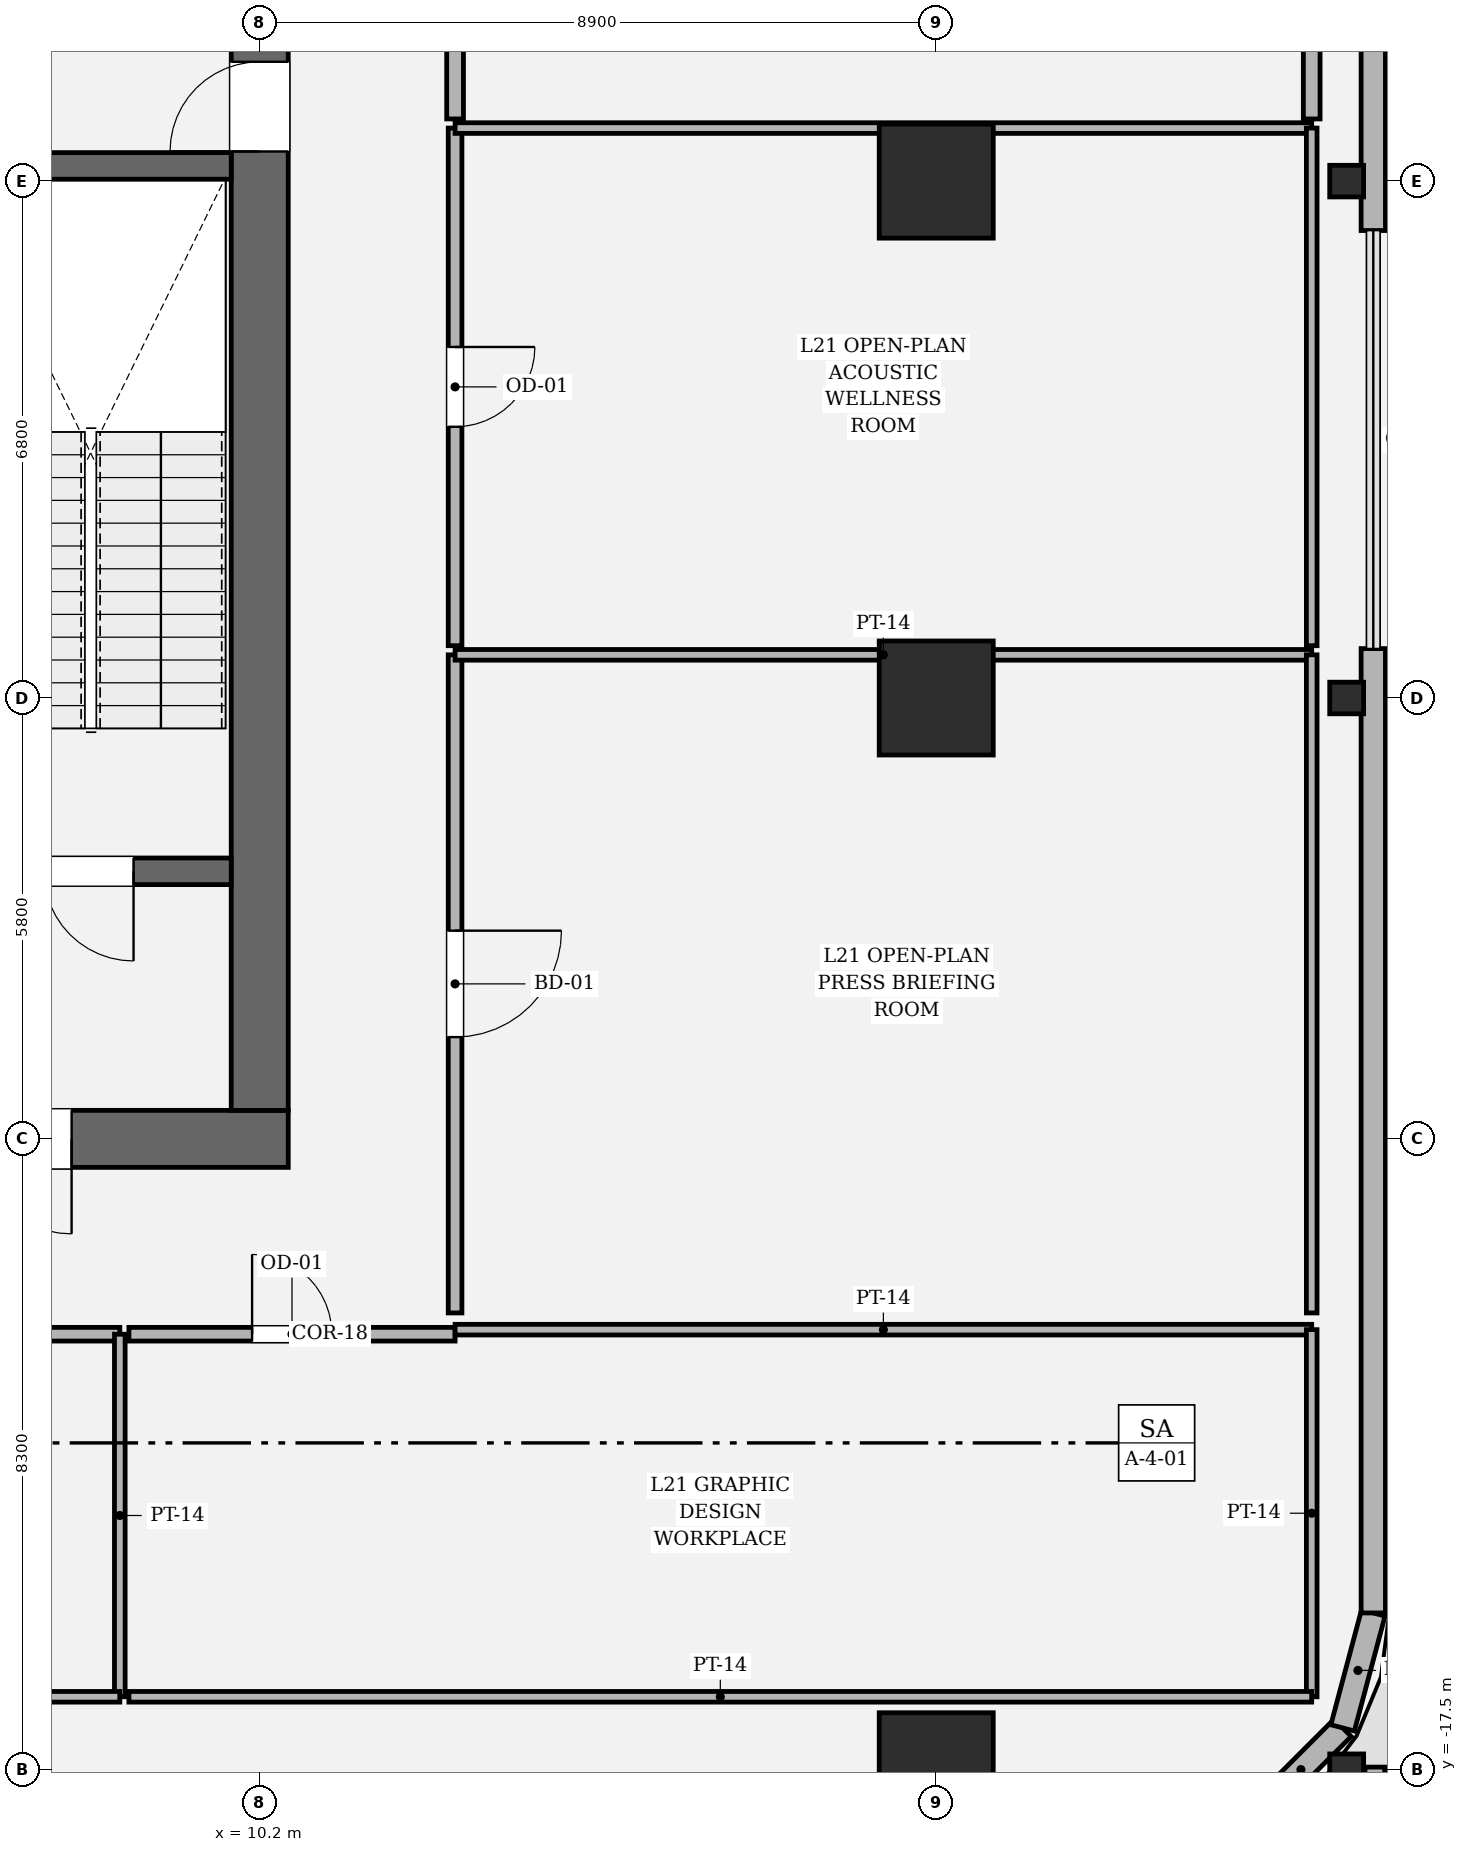
"""IFC4 building model, lengths in metres.
Left out: names, types, materials, properties, quantities, classifications, styles, units other than length and angle.
Written with IfcOpenShell. Run it as: python <this file> out.ifc"""

import sys

from ifc_helpers import new_model, si_unit, direction, frame, frame_2d, origin, origin_2d, place, context, subcontext, project, spatial, rectangle, hollow_rectangle, i_section, extrude, element, fill, save


model = new_model("IFC4")
c1 = context("Model", 3, precision=1e-05, world=origin(), true_north=direction((0.0, 1.0)))
c2 = subcontext(c1, "Body", "Model", "MODEL_VIEW")
j1 = project(units=[si_unit("LENGTHUNIT", "METRE"), si_unit("PLANEANGLEUNIT", "RADIAN")], contexts=[c1])
p1 = place(None, origin())
s1 = spatial("IfcSite", under=j1, at=p1, CompositionType="ELEMENT")
p2 = place(p1, origin())
s2 = spatial("IfcBuilding", under=s1, at=p2, CompositionType="ELEMENT")
p3 = place(p2, frame((0.0, 0.0, 93.0)))
s3 = spatial("IfcBuildingStorey", under=s2, at=p3, CompositionType="ELEMENT", Elevation=93.0)
p4 = place(p3, frame((10.575, -9.2, 0.0), z_axis=(0.0, 0.0, 1.0), x_axis=(-1.0, 0.0, 0.0)))
e1 = element("IfcWall", 1, at=p4, inside=s3, PredefinedType="SHEAR", context=c2, shape_type="SweptSolid", body=[
    extrude(rectangle(XDim=21.15, YDim=0.75, at=frame_2d((10.575, 0.0))), origin(), (0.0, 0.0, 1.0), 4.05),
])
p5 = place(p4, frame((2.85, 0.0, 0.0)))
e2 = element("IfcOpeningElement", 2, at=p5, cuts=e1, PredefinedType="OPENING", context=c2, shape_type="SweptSolid", body=[
    extrude(rectangle(XDim=1.25, YDim=2.25, at=frame_2d((0.625, 1.125))), frame((0.0, 0.385, 0.0), z_axis=(0.0, -1.0, 0.0), x_axis=(1.0, 0.0, 0.0)), (0.0, 0.0, 1.0), 0.77),
])
p6 = place(p4, frame((17.05, 0.0, 0.0)))
e3 = element("IfcOpeningElement", 3, at=p6, cuts=e1, PredefinedType="OPENING", context=c2, shape_type="SweptSolid", body=[
    extrude(rectangle(XDim=1.25, YDim=2.25, at=frame_2d((0.625, 1.125))), frame((0.0, 0.385, 0.0), z_axis=(0.0, -1.0, 0.0), x_axis=(1.0, 0.0, 0.0)), (0.0, 0.0, 1.0), 0.77),
])
p7 = place(p3, frame((10.2, 8.825, 0.0), z_axis=(0.0, 0.0, 1.0), x_axis=(0.0, -1.0, 0.0)))
e4 = element("IfcWall", 4, at=p7, inside=s3, PredefinedType="SHEAR", context=c2, shape_type="SweptSolid", body=[
    extrude(rectangle(XDim=17.65, YDim=0.75, at=frame_2d((8.825, 0.0))), origin(), (0.0, 0.0, 1.0), 4.05),
])
p8 = place(p7, frame((3.855, 0.0, 0.0)))
e5 = element("IfcOpeningElement", 5, at=p8, cuts=e4, PredefinedType="OPENING", context=c2, shape_type="SweptSolid", body=[
    extrude(rectangle(XDim=1.18, YDim=2.2, at=frame_2d((0.59, 1.1))), frame((0.0, 0.385, 0.0), z_axis=(0.0, -1.0, 0.0), x_axis=(1.0, 0.0, 0.0)), (0.0, 0.0, 1.0), 0.77),
])
p9 = place(p3, frame((4.65, -5.68, 0.0), z_axis=(0.0, 0.0, 1.0), x_axis=(1.0, 0.0, 0.0)))
e6 = element("IfcWall", 6, at=p9, inside=s3, PredefinedType="SOLIDWALL", context=c2, shape_type="SweptSolid", body=[
    extrude(rectangle(XDim=5.175, YDim=0.35, at=frame_2d((2.587, 0.0))), origin(), (0.0, 0.0, 1.0), 4.05),
])
p10 = place(p9, frame((2.71, 0.0, 0.0)))
e7 = element("IfcOpeningElement", 7, at=p10, cuts=e6, PredefinedType="OPENING", context=c2, shape_type="SweptSolid", body=[
    extrude(rectangle(XDim=1.18, YDim=2.2, at=frame_2d((0.59, 1.1))), frame((0.0, 0.185, 0.0), z_axis=(0.0, -1.0, 0.0), x_axis=(1.0, 0.0, 0.0)), (0.0, 0.0, 1.0), 0.37),
])
p11 = place(p3, frame((4.65, 3.6, 0.0), z_axis=(0.0, 0.0, 1.0), x_axis=(1.0, 0.0, 0.0)))
e8 = element("IfcWall", 8, at=p11, inside=s3, PredefinedType="SOLIDWALL", context=c2, shape_type="SweptSolid", body=[
    extrude(rectangle(XDim=5.175, YDim=0.35, at=frame_2d((2.587, 0.0))), origin(), (0.0, 0.0, 1.0), 4.05),
])
for number, where, z_axis, x_axis in (
    (9, (19.1, -17.5, 0.0), (0.0, 0.0, 1.0), (1.0, 0.0, 0.0)),
    (10, (19.1, -3.4, 0.0), (0.0, 0.0, 1.0), (1.0, 0.0, 0.0)),
    (11, (19.1, 3.4, 0.0), (0.0, 0.0, 1.0), (1.0, 0.0, 0.0)),
):
    element("IfcColumn", number, at=place(p3, frame(where, z_axis=z_axis, x_axis=x_axis)), inside=s3, PredefinedType="COLUMN", context=c2, shape_type="SweptSolid", body=[
        extrude(hollow_rectangle(XDim=1.5, YDim=1.5, WallThickness=0.045, at=origin_2d()), origin(), (0.0, 0.0, 1.0), 4.05),
    ])
for number, where, z_axis, x_axis in (
    (12, (24.5, -17.5, 0.0), (0.0, 0.0, 1.0), (0.0, 1.0, 0.0)),
    (13, (24.5, -3.4, 0.0), (0.0, 0.0, 1.0), (0.0, 1.0, 0.0)),
    (14, (24.5, 3.4, 0.0), (0.0, 0.0, 1.0), (0.0, 1.0, 0.0)),
):
    element("IfcColumn", number, at=place(p3, frame(where, z_axis=z_axis, x_axis=x_axis)), inside=s3, PredefinedType="COLUMN", context=c2, shape_type="SweptSolid", body=[
        extrude(i_section(OverallWidth=0.416, OverallDepth=0.446, WebThickness=0.039, FlangeThickness=0.062, FilletRadius=0.018, at=origin_2d()), origin(), (0.0, 0.0, 1.0), 4.048),
    ])
p12 = place(p3, frame((23.349, -18.047, 0.0), z_axis=(0.0, 0.0, 1.0), x_axis=(0.707106781187, 0.707106781187, 0.0)))
e15 = element("IfcWall", 15, at=p12, inside=s3, PredefinedType="SOLIDWALL", context=c2, shape_type="SweptSolid", body=[
    extrude(rectangle(XDim=1.552, YDim=0.32, at=frame_2d((0.776, 0.0))), origin(), (0.0, 0.0, 1.0), 2.484),
])
p13 = place(p3, frame((24.447, -16.949, 0.0), z_axis=(0.0, 0.0, 1.0), x_axis=(0.257847112249, 0.966185730957, 0.0)))
e16 = element("IfcWall", 16, at=p13, inside=s3, PredefinedType="SOLIDWALL", context=c2, shape_type="SweptSolid", body=[
    extrude(rectangle(XDim=1.565, YDim=0.32, at=frame_2d((0.783, 0.0))), origin(), (0.0, 0.0, 1.0), 2.524),
])
p14 = place(p3, frame((24.85, -15.437, 0.0), z_axis=(0.0, 0.0, 1.0), x_axis=(0.0, 1.0, 0.0)))
e17 = element("IfcWall", 17, at=p14, inside=s3, PredefinedType="SOLIDWALL", context=c2, shape_type="SweptSolid", body=[
    extrude(rectangle(XDim=12.687, YDim=0.32, at=frame_2d((6.344, 0.0))), origin(), (0.0, 0.0, 1.0), 2.524),
])
p15 = place(p3, frame((24.85, 2.75, 0.0), z_axis=(0.0, 0.0, 1.0), x_axis=(0.0, 1.0, 0.0)))
e18 = element("IfcWall", 18, at=p15, inside=s3, PredefinedType="SOLIDWALL", context=c2, shape_type="SweptSolid", body=[
    extrude(rectangle(XDim=17.487, YDim=0.32, at=frame_2d((8.743, 0.0))), origin(), (0.0, 0.0, 1.0), 2.524),
])
p16 = place(p3, frame((24.87, -20.238, 0.0), z_axis=(0.0, 0.0, 1.0), x_axis=(0.0, 1.0, 0.0)))
e19 = element("IfcWall", 19, at=p16, inside=s3, PredefinedType="PARAPET", context=c2, shape_type="SweptSolid", body=[
    extrude(rectangle(XDim=2.773, YDim=0.26, at=frame_2d((1.387, 0.0))), origin(), (0.0, 0.0, 1.0), 1.2),
])
p17 = place(p3, frame((1.27, -11.77, 0.0), z_axis=(0.0, 0.0, 1.0), x_axis=(1.0, 0.0, 0.0)))
e20 = element("IfcWall", 20, at=p17, inside=s3, PredefinedType="PARTITIONING", context=c2, shape_type="SweptSolid", body=[
    extrude(rectangle(XDim=7.089, YDim=0.18, at=frame_2d((3.544, 0.0))), origin(), (0.0, 0.0, 1.0), 3.104),
])
p18 = place(p3, frame((8.359, -11.77, 0.0), z_axis=(0.0, 0.0, 1.0), x_axis=(0.0, -1.0, 0.0)))
e21 = element("IfcWall", 21, at=p18, inside=s3, PredefinedType="PARTITIONING", context=c2, shape_type="SweptSolid", body=[
    extrude(rectangle(XDim=4.77, YDim=0.14, at=frame_2d((2.385, 0.0))), origin(), (0.0, 0.0, 1.0), 3.81),
])
p19 = place(p3, frame((8.359, -16.54, 0.0), z_axis=(0.0, 0.0, 1.0), x_axis=(-1.0, 0.0, 0.0)))
e22 = element("IfcWall", 22, at=p19, inside=s3, PredefinedType="PARTITIONING", context=c2, shape_type="SweptSolid", body=[
    extrude(rectangle(XDim=7.089, YDim=0.14, at=frame_2d((3.544, 0.0))), origin(), (0.0, 0.0, 1.0), 3.104),
])
p20 = place(p3, frame((8.479, -11.77, 0.0), z_axis=(0.0, 0.0, 1.0), x_axis=(1.0, 0.0, 0.0)))
e23 = element("IfcWall", 23, at=p20, inside=s3, PredefinedType="PARTITIONING", context=c2, shape_type="SweptSolid", body=[
    extrude(rectangle(XDim=4.291, YDim=0.18, at=frame_2d((2.146, 0.0))), origin(), (0.0, 0.0, 1.0), 3.104),
])
p21 = place(p20, frame((1.621, 0.0, 0.0)))
e24 = element("IfcOpeningElement", 24, at=p21, cuts=e23, PredefinedType="OPENING", context=c2, shape_type="SweptSolid", body=[
    extrude(rectangle(XDim=1.05, YDim=2.2, at=frame_2d((0.525, 1.1))), frame((0.0, 0.1, 0.0), z_axis=(0.0, -1.0, 0.0), x_axis=(1.0, 0.0, 0.0)), (0.0, 0.0, 1.0), 0.2),
])
p22 = place(p3, frame((12.77, -11.71, 0.0), z_axis=(0.0, 0.0, 1.0), x_axis=(1.0, 0.0, 0.0)))
e25 = element("IfcWall", 25, at=p22, inside=s3, PredefinedType="PARTITIONING", context=c2, shape_type="SweptSolid", body=[
    extrude(rectangle(XDim=11.27, YDim=0.14, at=frame_2d((5.635, 0.0))), origin(), (0.0, 0.0, 1.0), 3.104),
])
p23 = place(p3, frame((24.04, -11.71, 0.0), z_axis=(0.0, 0.0, 1.0), x_axis=(0.0, -1.0, 0.0)))
e26 = element("IfcWall", 26, at=p23, inside=s3, PredefinedType="PARTITIONING", context=c2, shape_type="SweptSolid", body=[
    extrude(rectangle(XDim=4.83, YDim=0.14, at=frame_2d((2.415, 0.0))), origin(), (0.0, 0.0, 1.0), 3.81),
])
p24 = place(p3, frame((24.04, -16.54, 0.0), z_axis=(0.0, 0.0, 1.0), x_axis=(-1.0, 0.0, 0.0)))
e27 = element("IfcWall", 27, at=p24, inside=s3, PredefinedType="PARTITIONING", context=c2, shape_type="SweptSolid", body=[
    extrude(rectangle(XDim=15.561, YDim=0.14, at=frame_2d((7.781, 0.0))), origin(), (0.0, 0.0, 1.0), 3.104),
])
p25 = place(p3, frame((12.77, -11.49, 0.0), z_axis=(0.0, 0.0, 1.0), x_axis=(0.0, 1.0, 0.0)))
e28 = element("IfcWall", 28, at=p25, inside=s3, PredefinedType="PARTITIONING", context=c2, shape_type="SweptSolid", body=[
    extrude(rectangle(XDim=8.658, YDim=0.18, at=frame_2d((4.329, 0.0))), origin(), (0.0, 0.0, 1.0), 3.104),
])
p26 = place(p25, frame((3.629, 0.0, 0.0)))
e29 = element("IfcOpeningElement", 29, at=p26, cuts=e28, PredefinedType="OPENING", context=c2, shape_type="SweptSolid", body=[
    extrude(rectangle(XDim=1.4, YDim=2.25, at=frame_2d((0.7, 1.125))), frame((0.0, 0.1, 0.0), z_axis=(0.0, -1.0, 0.0), x_axis=(1.0, 0.0, 0.0)), (0.0, 0.0, 1.0), 0.2),
])
p27 = place(p3, frame((12.77, -2.832, 0.0), z_axis=(0.0, 0.0, 1.0), x_axis=(1.0, 0.0, 0.0)))
e30 = element("IfcWall", 30, at=p27, inside=s3, PredefinedType="PARTITIONING", context=c2, shape_type="SweptSolid", body=[
    extrude(rectangle(XDim=11.27, YDim=0.14, at=frame_2d((5.635, 0.0))), origin(), (0.0, 0.0, 1.0), 3.104),
])
p28 = place(p3, frame((24.04, -2.832, 0.0), z_axis=(0.0, 0.0, 1.0), x_axis=(0.0, -1.0, 0.0)))
e31 = element("IfcWall", 31, at=p28, inside=s3, PredefinedType="PARTITIONING", context=c2, shape_type="SweptSolid", body=[
    extrude(rectangle(XDim=8.658, YDim=0.14, at=frame_2d((4.329, 0.0))), origin(), (0.0, 0.0, 1.0), 2.484),
])
p29 = place(p3, frame((12.77, -2.712, 0.0), z_axis=(0.0, 0.0, 1.0), x_axis=(0.0, 1.0, 0.0)))
e32 = element("IfcWall", 32, at=p29, inside=s3, PredefinedType="PARTITIONING", context=c2, shape_type="SweptSolid", body=[
    extrude(rectangle(XDim=6.81, YDim=0.18, at=frame_2d((3.405, 0.0))), origin(), (0.0, 0.0, 1.0), 3.104),
])
p30 = place(p29, frame((2.88, 0.0, 0.0)))
e33 = element("IfcOpeningElement", 33, at=p30, cuts=e32, PredefinedType="OPENING", context=c2, shape_type="SweptSolid", body=[
    extrude(rectangle(XDim=1.05, YDim=2.2, at=frame_2d((0.525, 1.1))), frame((0.0, 0.1, 0.0), z_axis=(0.0, -1.0, 0.0), x_axis=(1.0, 0.0, 0.0)), (0.0, 0.0, 1.0), 0.2),
])
p31 = place(p3, frame((12.77, 4.098, 0.0), z_axis=(0.0, 0.0, 1.0), x_axis=(1.0, 0.0, 0.0)))
e34 = element("IfcWall", 34, at=p31, inside=s3, PredefinedType="PARTITIONING", context=c2, shape_type="SweptSolid", body=[
    extrude(rectangle(XDim=11.27, YDim=0.14, at=frame_2d((5.635, 0.0))), origin(), (0.0, 0.0, 1.0), 3.104),
])
p32 = place(p3, frame((24.04, 4.098, 0.0), z_axis=(0.0, 0.0, 1.0), x_axis=(0.0, -1.0, 0.0)))
e35 = element("IfcWall", 35, at=p32, inside=s3, PredefinedType="PARTITIONING", context=c2, shape_type="SweptSolid", body=[
    extrude(rectangle(XDim=6.81, YDim=0.14, at=frame_2d((3.405, 0.0))), origin(), (0.0, 0.0, 1.0), 2.484),
])
p33 = place(p3, frame((12.77, 4.218, 0.0), z_axis=(0.0, 0.0, 1.0), x_axis=(0.0, 1.0, 0.0)))
e36 = element("IfcWall", 36, at=p33, inside=s3, PredefinedType="SOLIDWALL", context=c2, shape_type="SweptSolid", body=[
    extrude(rectangle(XDim=7.272, YDim=0.22, at=frame_2d((3.636, 0.0))), origin(), (0.0, 0.0, 1.0), 3.104),
])
p34 = place(p33, frame((3.086, 0.0, 0.0)))
e37 = element("IfcOpeningElement", 37, at=p34, cuts=e36, PredefinedType="OPENING", context=c2, shape_type="SweptSolid", body=[
    extrude(rectangle(XDim=1.1, YDim=2.2, at=frame_2d((0.55, 1.1))), frame((0.0, 0.12, 0.0), z_axis=(0.0, -1.0, 0.0), x_axis=(1.0, 0.0, 0.0)), (0.0, 0.0, 1.0), 0.24),
])
p35 = place(p3, frame((24.04, 11.49, 0.0), z_axis=(0.0, 0.0, 1.0), x_axis=(0.0, -1.0, 0.0)))
e38 = element("IfcWall", 38, at=p35, inside=s3, PredefinedType="SOLIDWALL", context=c2, shape_type="SweptSolid", body=[
    extrude(rectangle(XDim=7.272, YDim=0.22, at=frame_2d((3.636, 0.0))), origin(), (0.0, 0.0, 1.0), 3.81),
])
p36 = place(p10, origin())
e39 = element("IfcDoor", 39, at=p36, inside=s3, OperationType="SINGLE_SWING_RIGHT", PredefinedType="DOOR", context=c2, shape_type="SweptSolid", body=[
    extrude(rectangle(XDim=1.18, YDim=2.2, at=frame_2d((0.59, 1.1))), frame((0.0, 0.025, 0.0), z_axis=(0.0, -1.0, 0.0), x_axis=(1.0, 0.0, 0.0)), (0.0, 0.0, 1.0), 0.05),
])
fill(e7, e39)
p37 = place(p5, origin())
e40 = element("IfcDoor", 40, at=p37, inside=s3, OperationType="SINGLE_SWING_LEFT", PredefinedType="DOOR", context=c2, shape_type="SweptSolid", body=[
    extrude(rectangle(XDim=1.25, YDim=2.25, at=frame_2d((0.625, 1.125))), frame((0.0, 0.025, 0.0), z_axis=(0.0, -1.0, 0.0), x_axis=(1.0, 0.0, 0.0)), (0.0, 0.0, 1.0), 0.05),
])
fill(e2, e40)
p38 = place(p8, origin())
e41 = element("IfcDoor", 41, at=p38, inside=s3, OperationType="SINGLE_SWING_RIGHT", PredefinedType="DOOR", context=c2, shape_type="SweptSolid", body=[
    extrude(rectangle(XDim=1.18, YDim=2.2, at=frame_2d((0.59, 1.1))), frame((0.0, 0.025, 0.0), z_axis=(0.0, -1.0, 0.0), x_axis=(1.0, 0.0, 0.0)), (0.0, 0.0, 1.0), 0.05),
])
fill(e5, e41)
p39 = place(p21, origin())
e42 = element("IfcDoor", 42, at=p39, inside=s3, OperationType="SINGLE_SWING_LEFT", PredefinedType="DOOR", context=c2, shape_type="SweptSolid", body=[
    extrude(rectangle(XDim=1.05, YDim=2.2, at=frame_2d((0.525, 1.1))), frame((0.0, 0.025, 0.0), z_axis=(0.0, -1.0, 0.0), x_axis=(1.0, 0.0, 0.0)), (0.0, 0.0, 1.0), 0.05),
])
fill(e24, e42)
p40 = place(p26, origin())
e43 = element("IfcDoor", 43, at=p40, inside=s3, OperationType="SINGLE_SWING_RIGHT", PredefinedType="DOOR", context=c2, shape_type="SweptSolid", body=[
    extrude(rectangle(XDim=1.4, YDim=2.25, at=frame_2d((0.7, 1.125))), frame((0.0, 0.025, 0.0), z_axis=(0.0, -1.0, 0.0), x_axis=(1.0, 0.0, 0.0)), (0.0, 0.0, 1.0), 0.05),
])
fill(e29, e43)
p41 = place(p30, origin())
e44 = element("IfcDoor", 44, at=p41, inside=s3, OperationType="SINGLE_SWING_RIGHT", PredefinedType="DOOR", context=c2, shape_type="SweptSolid", body=[
    extrude(rectangle(XDim=1.05, YDim=2.2, at=frame_2d((0.525, 1.1))), frame((0.0, 0.025, 0.0), z_axis=(0.0, -1.0, 0.0), x_axis=(1.0, 0.0, 0.0)), (0.0, 0.0, 1.0), 0.05),
])
fill(e33, e44)
save(model, sys.argv[1])
